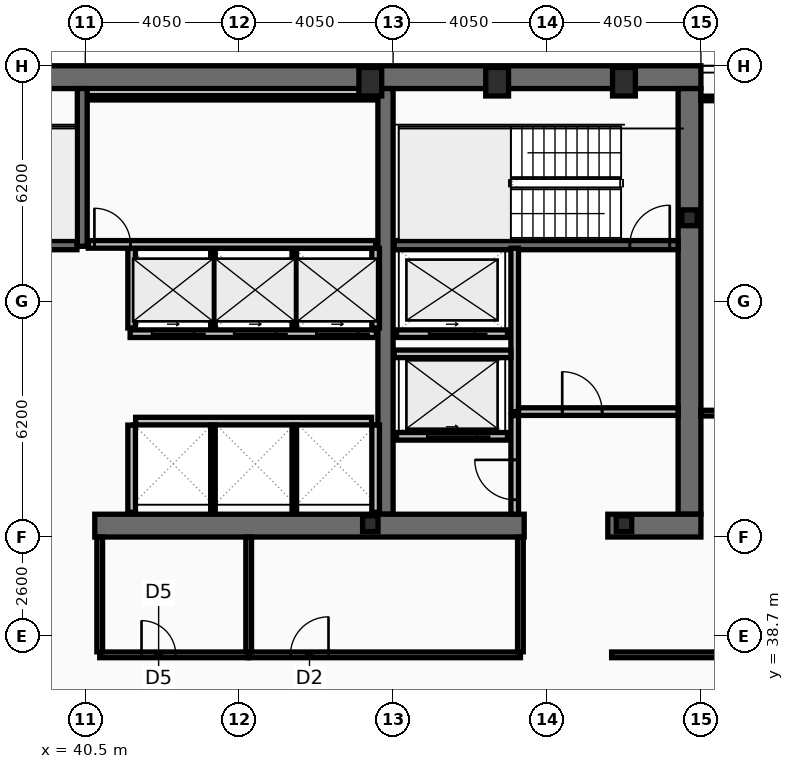
"""IFC4 building model, lengths in metres.
Left out: names, types, materials, properties, quantities, classifications, styles, units other than length and angle.
Written with IfcOpenShell. Run it as: python <this file> out.ifc"""

import sys

from ifc_helpers import new_model, si_unit, direction, frame, frame_2d, origin, origin_2d, place, context, subcontext, project, spatial, rectangle, hollow_rectangle, i_section, extrude, element, fill, save


model = new_model("IFC4")
c1 = context("Model", 3, precision=1e-05, world=origin(), true_north=direction((0.0, 1.0)))
c2 = subcontext(c1, "Body", "Model", "MODEL_VIEW")
j1 = project(units=[si_unit("LENGTHUNIT", "METRE"), si_unit("PLANEANGLEUNIT", "RADIAN")], contexts=[c1])
p1 = place(None, origin())
s1 = spatial("IfcSite", under=j1, at=p1, CompositionType="ELEMENT")
p2 = place(p1, origin())
s2 = spatial("IfcBuilding", under=s1, at=p2, CompositionType="ELEMENT")
p3 = place(p2, frame((0.0, 0.0, 228.2)))
s3 = spatial("IfcBuildingStorey", under=s2, at=p3, CompositionType="ELEMENT", Elevation=228.2)
p4 = place(p3, frame((16.2, 53.4, 0.0), z_axis=(0.0, 0.0, 1.0), x_axis=(1.0, 0.0, 0.0)))
e1 = element("IfcWall", 1, at=p4, inside=s3, PredefinedType="SHEAR", context=c2, shape_type="SweptSolid", body=[
    extrude(rectangle(XDim=40.5, YDim=0.6, at=frame_2d((20.25, 0.0))), origin(), (0.0, 0.0, 1.0), 3.44),
])
p5 = place(p3, frame((56.4, 53.1, 0.0), z_axis=(0.0, 0.0, 1.0), x_axis=(0.0, -1.0, 0.0)))
e2 = element("IfcWall", 2, at=p5, inside=s3, PredefinedType="SHEAR", context=c2, shape_type="SweptSolid", body=[
    extrude(rectangle(XDim=11.2, YDim=0.6, at=frame_2d((5.6, 0.0))), origin(), (0.0, 0.0, 1.0), 3.44),
])
p6 = place(p3, frame((48.4, 41.9, 0.0), z_axis=(0.0, 0.0, 1.0), x_axis=(0.0, 1.0, 0.0)))
e3 = element("IfcWall", 3, at=p6, inside=s3, PredefinedType="SHEAR", context=c2, shape_type="SweptSolid", body=[
    extrude(rectangle(XDim=11.2, YDim=0.4, at=frame_2d((5.6, 0.0))), origin(), (0.0, 0.0, 1.0), 3.44),
])
p7 = place(p3, frame((52.05, 41.6, 0.0), z_axis=(0.0, 0.0, 1.0), x_axis=(-1.0, 0.0, 0.0)))
e4 = element("IfcWall", 4, at=p7, inside=s3, PredefinedType="SHEAR", context=c2, shape_type="SweptSolid", body=[
    extrude(rectangle(XDim=11.3, YDim=0.6, at=frame_2d((5.65, 0.0))), origin(), (0.0, 0.0, 1.0), 3.44),
])
p8 = place(p3, frame((56.7, 41.6, 0.0), z_axis=(0.0, 0.0, 1.0), x_axis=(-1.0, 0.0, 0.0)))
e5 = element("IfcWall", 5, at=p8, inside=s3, PredefinedType="SHEAR", context=c2, shape_type="SweptSolid", body=[
    extrude(rectangle(XDim=2.45, YDim=0.6, at=frame_2d((1.225, 0.0))), origin(), (0.0, 0.0, 1.0), 3.44),
])
p9 = place(p3, frame((40.42, 48.95, 0.0), z_axis=(0.0, 0.0, 1.0), x_axis=(0.0, 1.0, 0.0)))
e6 = element("IfcWall", 6, at=p9, inside=s3, PredefinedType="SHEAR", context=c2, shape_type="SweptSolid", body=[
    extrude(rectangle(XDim=4.15, YDim=0.26, at=frame_2d((2.075, 0.0))), origin(), (0.0, 0.0, 1.0), 3.44),
])
p10 = place(p3, frame((48.63, 48.98, 0.0), z_axis=(0.0, 0.0, 1.0), x_axis=(1.0, 0.0, 0.0)))
e7 = element("IfcWall", 7, at=p10, inside=s3, PredefinedType="SHEAR", context=c2, shape_type="SweptSolid", body=[
    extrude(rectangle(XDim=7.47, YDim=0.24, at=frame_2d((3.735, 0.0))), origin(), (0.0, 0.0, 1.0), 3.44),
])
p11 = place(p10, frame((6.2, 0.0, 0.0)))
e8 = element("IfcOpeningElement", 8, at=p11, cuts=e7, PredefinedType="OPENING", context=c2, shape_type="SweptSolid", body=[
    extrude(rectangle(XDim=1.05, YDim=2.15, at=frame_2d((0.525, 1.075))), frame((0.0, 0.13, 0.0), z_axis=(0.0, -1.0, 0.0), x_axis=(1.0, 0.0, 0.0)), (0.0, 0.0, 1.0), 0.26),
])
p12 = place(p3, frame((32.72, 48.98, 0.0), z_axis=(0.0, 0.0, 1.0), x_axis=(1.0, 0.0, 0.0)))
e9 = element("IfcWall", 9, at=p12, inside=s3, PredefinedType="SHEAR", context=c2, shape_type="SweptSolid", body=[
    extrude(rectangle(XDim=7.56, YDim=0.24, at=frame_2d((3.78, 0.0))), origin(), (0.0, 0.0, 1.0), 3.44),
])
p13 = place(p12, frame((0.22, 0.0, 0.0)))
e10 = element("IfcOpeningElement", 10, at=p13, cuts=e9, PredefinedType="OPENING", context=c2, shape_type="SweptSolid", body=[
    extrude(rectangle(XDim=1.05, YDim=2.15, at=frame_2d((0.525, 1.075))), frame((0.0, 0.13, 0.0), z_axis=(0.0, -1.0, 0.0), x_axis=(1.0, 0.0, 0.0)), (0.0, 0.0, 1.0), 0.26),
])
for number, where, z_axis, x_axis in (
    (11, (48.0, 53.28, 0.0), (0.0, 0.0, 1.0), (1.0, 0.0, 0.0)),
    (12, (51.337, 53.28, 0.0), (0.0, 0.0, 1.0), (1.0, 0.0, 0.0)),
    (13, (54.675, 53.28, 0.0), (0.0, 0.0, 1.0), (1.0, 0.0, 0.0)),
):
    element("IfcColumn", number, at=place(p3, frame(where, z_axis=z_axis, x_axis=x_axis)), inside=s3, PredefinedType="COLUMN", context=c2, shape_type="SweptSolid", body=[
        extrude(hollow_rectangle(XDim=0.6, YDim=0.75, WallThickness=0.045, at=origin_2d()), origin(), (0.0, 0.0, 1.0), 3.6),
    ])
for number, where, z_axis, x_axis in (
    (14, (56.4, 49.7, 0.0), (0.0, 0.0, 1.0), (1.0, 0.0, 0.0)),
    (15, (48.0, 41.65, 0.0), (0.0, 0.0, 1.0), (1.0, 0.0, 0.0)),
    (16, (54.675, 41.65, 0.0), (0.0, 0.0, 1.0), (1.0, 0.0, 0.0)),
):
    element("IfcColumn", number, at=place(p3, frame(where, z_axis=z_axis, x_axis=x_axis)), inside=s3, PredefinedType="COLUMN", context=c2, shape_type="SweptSolid", body=[
        extrude(i_section(OverallWidth=0.406, OverallDepth=0.416, WebThickness=0.03, FlangeThickness=0.048, at=origin_2d()), origin(), (0.0, 0.0, 1.0), 3.6),
    ])
p14 = place(p3, frame((51.61, 43.95, 0.0), z_axis=(0.0, 0.0, 1.0), x_axis=(-1.0, 0.0, 0.0)))
e17 = element("IfcWall", 17, at=p14, inside=s3, PredefinedType="PARTITIONING", context=c2, shape_type="SweptSolid", body=[
    extrude(rectangle(XDim=2.92, YDim=0.2, at=frame_2d((1.46, 0.0))), origin(), (0.0, 0.0, 1.0), 3.44),
])
p15 = place(p14, frame((0.81, 0.0, 0.0)))
e18 = element("IfcOpeningElement", 18, at=p15, cuts=e17, PredefinedType="OPENING", context=c2, shape_type="SweptSolid", body=[
    extrude(rectangle(XDim=1.3, YDim=2.18, at=frame_2d((0.65, 1.09))), frame((0.0, 0.11, 0.0), z_axis=(0.0, -1.0, 0.0), x_axis=(1.0, 0.0, 0.0)), (0.0, 0.0, 1.0), 0.22),
])
p16 = place(p3, frame((51.61, 46.65, 0.0), z_axis=(0.0, 0.0, 1.0), x_axis=(-1.0, 0.0, 0.0)))
e19 = element("IfcWall", 19, at=p16, inside=s3, PredefinedType="PARTITIONING", context=c2, shape_type="SweptSolid", body=[
    extrude(rectangle(XDim=2.92, YDim=0.2, at=frame_2d((1.46, 0.0))), origin(), (0.0, 0.0, 1.0), 3.44),
])
p17 = place(p16, frame((0.86, 0.0, 0.0)))
e20 = element("IfcOpeningElement", 20, at=p17, cuts=e19, PredefinedType="OPENING", context=c2, shape_type="SweptSolid", body=[
    extrude(rectangle(XDim=1.2, YDim=2.18, at=frame_2d((0.6, 1.09))), frame((0.0, 0.11, 0.0), z_axis=(0.0, -1.0, 0.0), x_axis=(1.0, 0.0, 0.0)), (0.0, 0.0, 1.0), 0.22),
])
p18 = place(p3, frame((48.16, 46.65, 0.0), z_axis=(0.0, 0.0, 1.0), x_axis=(-1.0, 0.0, 0.0)))
e21 = element("IfcWall", 21, at=p18, inside=s3, PredefinedType="PARTITIONING", context=c2, shape_type="SweptSolid", body=[
    extrude(rectangle(XDim=6.48, YDim=0.2, at=frame_2d((3.24, 0.0))), origin(), (0.0, 0.0, 1.0), 3.44),
])
p19 = place(p18, frame((4.8, 0.0, 0.0)))
e22 = element("IfcOpeningElement", 22, at=p19, cuts=e21, PredefinedType="OPENING", context=c2, shape_type="SweptSolid", body=[
    extrude(rectangle(XDim=1.1, YDim=2.18, at=frame_2d((0.55, 1.09))), frame((0.0, 0.11, 0.0), z_axis=(0.0, -1.0, 0.0), x_axis=(1.0, 0.0, 0.0)), (0.0, 0.0, 1.0), 0.22),
])
p20 = place(p18, frame((2.64, 0.0, 0.0)))
e23 = element("IfcOpeningElement", 23, at=p20, cuts=e21, PredefinedType="OPENING", context=c2, shape_type="SweptSolid", body=[
    extrude(rectangle(XDim=1.1, YDim=2.18, at=frame_2d((0.55, 1.09))), frame((0.0, 0.11, 0.0), z_axis=(0.0, -1.0, 0.0), x_axis=(1.0, 0.0, 0.0)), (0.0, 0.0, 1.0), 0.22),
])
p21 = place(p18, frame((0.48, 0.0, 0.0)))
e24 = element("IfcOpeningElement", 24, at=p21, cuts=e21, PredefinedType="OPENING", context=c2, shape_type="SweptSolid", body=[
    extrude(rectangle(XDim=1.1, YDim=2.18, at=frame_2d((0.55, 1.09))), frame((0.0, 0.11, 0.0), z_axis=(0.0, -1.0, 0.0), x_axis=(1.0, 0.0, 0.0)), (0.0, 0.0, 1.0), 0.22),
])
p22 = place(p3, frame((51.8, 44.6, 0.0), z_axis=(0.0, 0.0, 1.0), x_axis=(0.0, 1.0, 0.0)))
e25 = element("IfcWall", 25, at=p22, inside=s3, PredefinedType="PARTITIONING", context=c2, shape_type="SweptSolid", body=[
    extrude(rectangle(XDim=4.3, YDim=0.2, at=frame_2d((2.15, 0.0))), origin(), (0.0, 0.0, 1.0), 3.44),
])
p23 = place(p3, frame((51.9, 44.6, 0.0), z_axis=(0.0, 0.0, 1.0), x_axis=(1.0, 0.0, 0.0)))
e26 = element("IfcWall", 26, at=p23, inside=s3, PredefinedType="PARTITIONING", context=c2, shape_type="SweptSolid", body=[
    extrude(rectangle(XDim=4.2, YDim=0.2, at=frame_2d((2.1, 0.0))), origin(), (0.0, 0.0, 1.0), 3.44),
])
p24 = place(p23, frame((1.15, 0.0, 0.0)))
e27 = element("IfcOpeningElement", 27, at=p24, cuts=e26, PredefinedType="OPENING", context=c2, shape_type="SweptSolid", body=[
    extrude(rectangle(XDim=1.05, YDim=2.15, at=frame_2d((0.525, 1.075))), frame((0.0, 0.11, 0.0), z_axis=(0.0, -1.0, 0.0), x_axis=(1.0, 0.0, 0.0)), (0.0, 0.0, 1.0), 0.22),
])
p25 = place(p3, frame((48.63, 46.12, 0.0), z_axis=(0.0, 0.0, 1.0), x_axis=(1.0, 0.0, 0.0)))
e28 = element("IfcWall", 28, at=p25, inside=s3, PredefinedType="PARTITIONING", context=c2, shape_type="SweptSolid", body=[
    extrude(rectangle(XDim=3.07, YDim=0.2, at=frame_2d((1.535, 0.0))), origin(), (0.0, 0.0, 1.0), 3.44),
])
p26 = place(p3, frame((51.8, 41.9, 0.0), z_axis=(0.0, 0.0, 1.0), x_axis=(0.0, 1.0, 0.0)))
e29 = element("IfcWall", 29, at=p26, inside=s3, PredefinedType="PARTITIONING", context=c2, shape_type="SweptSolid", body=[
    extrude(rectangle(XDim=2.595, YDim=0.2, at=frame_2d((1.298, 0.0))), origin(), (0.0, 0.0, 1.0), 3.44),
])
p27 = place(p26, frame((0.38, 0.0, 0.0)))
e30 = element("IfcOpeningElement", 30, at=p27, cuts=e29, PredefinedType="OPENING", context=c2, shape_type="SweptSolid", body=[
    extrude(rectangle(XDim=1.05, YDim=2.15, at=frame_2d((0.525, 1.075))), frame((0.0, 0.11, 0.0), z_axis=(0.0, -1.0, 0.0), x_axis=(1.0, 0.0, 0.0)), (0.0, 0.0, 1.0), 0.22),
])
for number, where, z_axis, x_axis in (
    (31, (41.72, 46.8, 0.0), (0.0, 0.0, 1.0), (0.0, 1.0, 0.0)),
    (32, (48.14, 46.8, 0.0), (0.0, 0.0, 1.0), (0.0, 1.0, 0.0)),
):
    element("IfcWall", number, at=place(p3, frame(where, z_axis=z_axis, x_axis=x_axis)), inside=s3, PredefinedType="PARTITIONING", context=c2, shape_type="SweptSolid", body=[
        extrude(rectangle(XDim=2.095, YDim=0.2, at=frame_2d((1.047, 0.0))), origin(), (0.0, 0.0, 1.0), 3.44),
    ])
for number, where, z_axis, x_axis in (
    (33, (43.86, 46.8, 0.0), (0.0, 0.0, 1.0), (0.0, 1.0, 0.0)),
    (34, (46.0, 46.8, 0.0), (0.0, 0.0, 1.0), (0.0, 1.0, 0.0)),
):
    element("IfcWall", number, at=place(p3, frame(where, z_axis=z_axis, x_axis=x_axis)), inside=s3, PredefinedType="PARTITIONING", context=c2, shape_type="SweptSolid", body=[
        extrude(rectangle(XDim=2.095, YDim=0.12, at=frame_2d((1.047, 0.0))), origin(), (0.0, 0.0, 1.0), 3.44),
    ])
p28 = place(p3, frame((41.825, 44.35, 0.0), z_axis=(0.0, 0.0, 1.0), x_axis=(1.0, 0.0, 0.0)))
e35 = element("IfcWall", 35, at=p28, inside=s3, PredefinedType="PARTITIONING", context=c2, shape_type="SweptSolid", body=[
    extrude(rectangle(XDim=6.21, YDim=0.2, at=frame_2d((3.105, 0.0))), origin(), (0.0, 0.0, 1.0), 3.44),
])
for number, where, z_axis, x_axis in (
    (36, (41.72, 41.95, 0.0), (0.0, 0.0, 1.0), (0.0, 1.0, 0.0)),
    (37, (48.14, 41.95, 0.0), (0.0, 0.0, 1.0), (0.0, 1.0, 0.0)),
):
    element("IfcWall", number, at=place(p3, frame(where, z_axis=z_axis, x_axis=x_axis)), inside=s3, PredefinedType="PARTITIONING", context=c2, shape_type="SweptSolid", body=[
        extrude(rectangle(XDim=2.295, YDim=0.2, at=frame_2d((1.147, 0.0))), origin(), (0.0, 0.0, 1.0), 3.44),
    ])
for number, where, z_axis, x_axis in (
    (38, (43.86, 41.95, 0.0), (0.0, 0.0, 1.0), (0.0, 1.0, 0.0)),
    (39, (46.0, 41.95, 0.0), (0.0, 0.0, 1.0), (0.0, 1.0, 0.0)),
):
    element("IfcWall", number, at=place(p3, frame(where, z_axis=z_axis, x_axis=x_axis)), inside=s3, PredefinedType="PARTITIONING", context=c2, shape_type="SweptSolid", body=[
        extrude(rectangle(XDim=2.295, YDim=0.12, at=frame_2d((1.147, 0.0))), origin(), (0.0, 0.0, 1.0), 3.44),
    ])
p29 = place(p3, frame((40.58, 52.86, 0.0), z_axis=(0.0, 0.0, 1.0), x_axis=(1.0, 0.0, 0.0)))
e40 = element("IfcWall", 40, at=p29, inside=s3, PredefinedType="PARTITIONING", context=c2, shape_type="SweptSolid", body=[
    extrude(rectangle(XDim=7.56, YDim=0.12, at=frame_2d((3.78, 0.0))), origin(), (0.0, 0.0, 1.0), 3.44),
])
p30 = place(p3, frame((40.58, 49.0, 0.0), z_axis=(0.0, 0.0, 1.0), x_axis=(1.0, 0.0, 0.0)))
e41 = element("IfcWall", 41, at=p30, inside=s3, PredefinedType="PARTITIONING", context=c2, shape_type="SweptSolid", body=[
    extrude(rectangle(XDim=7.56, YDim=0.2, at=frame_2d((3.78, 0.0))), origin(), (0.0, 0.0, 1.0), 3.44),
])
p31 = place(p30, frame((0.16, 0.0, 0.0)))
e42 = element("IfcOpeningElement", 42, at=p31, cuts=e41, PredefinedType="OPENING", context=c2, shape_type="SweptSolid", body=[
    extrude(rectangle(XDim=0.95, YDim=2.1, at=frame_2d((0.475, 1.05))), frame((0.0, 0.11, 0.0), z_axis=(0.0, -1.0, 0.0), x_axis=(1.0, 0.0, 0.0)), (0.0, 0.0, 1.0), 0.22),
])
p32 = place(p3, frame((40.88, 38.2, 0.0), z_axis=(0.0, 0.0, 1.0), x_axis=(1.0, 0.0, 0.0)))
e43 = element("IfcWall", 43, at=p32, inside=s3, PredefinedType="PARTITIONING", context=c2, shape_type="SweptSolid", body=[
    extrude(rectangle(XDim=3.92, YDim=0.15, at=frame_2d((1.96, 0.0))), origin(), (0.0, 0.0, 1.0), 2.78),
])
p33 = place(p32, frame((1.1, 0.0, 0.0)))
e44 = element("IfcOpeningElement", 44, at=p33, cuts=e43, PredefinedType="OPENING", context=c2, shape_type="SweptSolid", body=[
    extrude(rectangle(XDim=0.9, YDim=2.05, at=frame_2d((0.45, 1.025))), frame((0.0, 0.085, 0.0), z_axis=(0.0, -1.0, 0.0), x_axis=(1.0, 0.0, 0.0)), (0.0, 0.0, 1.0), 0.17),
])
p34 = place(p3, frame((44.8, 38.2, 0.0), z_axis=(0.0, 0.0, 1.0), x_axis=(1.0, 0.0, 0.0)))
e45 = element("IfcWall", 45, at=p34, inside=s3, PredefinedType="PARTITIONING", context=c2, shape_type="SweptSolid", body=[
    extrude(rectangle(XDim=7.15, YDim=0.15, at=frame_2d((3.575, 0.0))), origin(), (0.0, 0.0, 1.0), 2.78),
])
p35 = place(p34, frame((1.1, 0.0, 0.0)))
e46 = element("IfcOpeningElement", 46, at=p35, cuts=e45, PredefinedType="OPENING", context=c2, shape_type="SweptSolid", body=[
    extrude(rectangle(XDim=1.0, YDim=2.05, at=frame_2d((0.5, 1.025))), frame((0.0, 0.085, 0.0), z_axis=(0.0, -1.0, 0.0), x_axis=(1.0, 0.0, 0.0)), (0.0, 0.0, 1.0), 0.17),
])
for number, where, z_axis, x_axis in (
    (47, (40.88, 38.28, 0.0), (0.0, 0.0, 1.0), (0.0, 1.0, 0.0)),
    (48, (44.8, 38.28, 0.0), (0.0, 0.0, 1.0), (0.0, 1.0, 0.0)),
    (49, (51.95, 38.28, 0.0), (0.0, 0.0, 1.0), (0.0, 1.0, 0.0)),
):
    element("IfcWall", number, at=place(p3, frame(where, z_axis=z_axis, x_axis=x_axis)), inside=s3, PredefinedType="PARTITIONING", context=c2, shape_type="SweptSolid", body=[
        extrude(rectangle(XDim=3.02, YDim=0.15, at=frame_2d((1.51, 0.0))), origin(), (0.0, 0.0, 1.0), 3.44),
    ])
p36 = place(p3, frame((54.35, 38.2, 0.0), z_axis=(0.0, 0.0, 1.0), x_axis=(1.0, 0.0, 0.0)))
e50 = element("IfcWall", 50, at=p36, inside=s3, PredefinedType="PARTITIONING", context=c2, shape_type="SweptSolid", body=[
    extrude(rectangle(XDim=10.52, YDim=0.15, at=frame_2d((5.26, 0.0))), origin(), (0.0, 0.0, 1.0), 2.78),
])
p37 = place(p36, frame((3.25, 0.0, 0.0)))
e51 = element("IfcOpeningElement", 51, at=p37, cuts=e50, PredefinedType="OPENING", context=c2, shape_type="SweptSolid", body=[
    extrude(rectangle(XDim=0.95, YDim=2.05, at=frame_2d((0.475, 1.025))), frame((0.0, 0.085, 0.0), z_axis=(0.0, -1.0, 0.0), x_axis=(1.0, 0.0, 0.0)), (0.0, 0.0, 1.0), 0.17),
])
p38 = place(p3, frame((56.7, 44.56, 0.0), z_axis=(0.0, 0.0, 1.0), x_axis=(1.0, 0.0, 0.0)))
e52 = element("IfcWall", 52, at=p38, inside=s3, PredefinedType="PARTITIONING", context=c2, shape_type="SweptSolid", body=[
    extrude(rectangle(XDim=8.105, YDim=0.15, at=frame_2d((4.052, 0.0))), origin(), (0.0, 0.0, 1.0), 2.83),
])
p39 = place(p38, frame((0.9, 0.0, 0.0)))
e53 = element("IfcOpeningElement", 53, at=p39, cuts=e52, PredefinedType="OPENING", context=c2, shape_type="SweptSolid", body=[
    extrude(rectangle(XDim=0.9, YDim=2.05, at=frame_2d((0.45, 1.025))), frame((0.0, 0.085, 0.0), z_axis=(0.0, -1.0, 0.0), x_axis=(1.0, 0.0, 0.0)), (0.0, 0.0, 1.0), 0.17),
])
p40 = place(p3, frame((56.7, 52.84, 0.0), z_axis=(0.0, 0.0, 1.0), x_axis=(1.0, 0.0, 0.0)))
e54 = element("IfcWall", 54, at=p40, inside=s3, PredefinedType="PARTITIONING", context=c2, shape_type="SweptSolid", body=[
    extrude(rectangle(XDim=8.105, YDim=0.12, at=frame_2d((4.052, 0.0))), origin(), (0.0, 0.0, 1.0), 3.44),
])
p41 = place(p11, origin())
e55 = element("IfcDoor", 55, at=p41, inside=s3, OperationType="SINGLE_SWING_RIGHT", PredefinedType="DOOR", context=c2, shape_type="SweptSolid", body=[
    extrude(rectangle(XDim=1.05, YDim=2.15, at=frame_2d((0.525, 1.075))), frame((0.0, 0.025, 0.0), z_axis=(0.0, -1.0, 0.0), x_axis=(1.0, 0.0, 0.0)), (0.0, 0.0, 1.0), 0.05),
])
fill(e8, e55)
p42 = place(p15, origin())
e56 = element("IfcDoor", 56, at=p42, inside=s3, OperationType="SLIDING_TO_LEFT", PredefinedType="DOOR", context=c2, shape_type="SweptSolid", body=[
    extrude(rectangle(XDim=1.3, YDim=2.18, at=frame_2d((0.65, 1.09))), frame((0.0, 0.025, 0.0), z_axis=(0.0, -1.0, 0.0), x_axis=(1.0, 0.0, 0.0)), (0.0, 0.0, 1.0), 0.05),
])
fill(e18, e56)
p43 = place(p17, origin())
e57 = element("IfcDoor", 57, at=p43, inside=s3, OperationType="SLIDING_TO_LEFT", PredefinedType="DOOR", context=c2, shape_type="SweptSolid", body=[
    extrude(rectangle(XDim=1.2, YDim=2.18, at=frame_2d((0.6, 1.09))), frame((0.0, 0.025, 0.0), z_axis=(0.0, -1.0, 0.0), x_axis=(1.0, 0.0, 0.0)), (0.0, 0.0, 1.0), 0.05),
])
fill(e20, e57)
p44 = place(p19, origin())
e58 = element("IfcDoor", 58, at=p44, inside=s3, OperationType="SLIDING_TO_LEFT", PredefinedType="DOOR", context=c2, shape_type="SweptSolid", body=[
    extrude(rectangle(XDim=1.1, YDim=2.18, at=frame_2d((0.55, 1.09))), frame((0.0, 0.025, 0.0), z_axis=(0.0, -1.0, 0.0), x_axis=(1.0, 0.0, 0.0)), (0.0, 0.0, 1.0), 0.05),
])
fill(e22, e58)
p45 = place(p20, origin())
e59 = element("IfcDoor", 59, at=p45, inside=s3, OperationType="SLIDING_TO_LEFT", PredefinedType="DOOR", context=c2, shape_type="SweptSolid", body=[
    extrude(rectangle(XDim=1.1, YDim=2.18, at=frame_2d((0.55, 1.09))), frame((0.0, 0.025, 0.0), z_axis=(0.0, -1.0, 0.0), x_axis=(1.0, 0.0, 0.0)), (0.0, 0.0, 1.0), 0.05),
])
fill(e23, e59)
p46 = place(p21, origin())
e60 = element("IfcDoor", 60, at=p46, inside=s3, OperationType="SLIDING_TO_LEFT", PredefinedType="DOOR", context=c2, shape_type="SweptSolid", body=[
    extrude(rectangle(XDim=1.1, YDim=2.18, at=frame_2d((0.55, 1.09))), frame((0.0, 0.025, 0.0), z_axis=(0.0, -1.0, 0.0), x_axis=(1.0, 0.0, 0.0)), (0.0, 0.0, 1.0), 0.05),
])
fill(e24, e60)
p47 = place(p24, origin())
e61 = element("IfcDoor", 61, at=p47, inside=s3, OperationType="SINGLE_SWING_LEFT", PredefinedType="DOOR", context=c2, shape_type="SweptSolid", body=[
    extrude(rectangle(XDim=1.05, YDim=2.15, at=frame_2d((0.525, 1.075))), frame((0.0, 0.025, 0.0), z_axis=(0.0, -1.0, 0.0), x_axis=(1.0, 0.0, 0.0)), (0.0, 0.0, 1.0), 0.05),
])
fill(e27, e61)
p48 = place(p27, origin())
e62 = element("IfcDoor", 62, at=p48, inside=s3, OperationType="SINGLE_SWING_RIGHT", PredefinedType="DOOR", context=c2, shape_type="SweptSolid", body=[
    extrude(rectangle(XDim=1.05, YDim=2.15, at=frame_2d((0.525, 1.075))), frame((0.0, 0.025, 0.0), z_axis=(0.0, -1.0, 0.0), x_axis=(1.0, 0.0, 0.0)), (0.0, 0.0, 1.0), 0.05),
])
fill(e30, e62)
p49 = place(p31, origin())
e63 = element("IfcDoor", 63, at=p49, inside=s3, OperationType="SINGLE_SWING_LEFT", PredefinedType="DOOR", context=c2, shape_type="SweptSolid", body=[
    extrude(rectangle(XDim=0.95, YDim=2.1, at=frame_2d((0.475, 1.05))), frame((0.0, 0.025, 0.0), z_axis=(0.0, -1.0, 0.0), x_axis=(1.0, 0.0, 0.0)), (0.0, 0.0, 1.0), 0.05),
])
fill(e42, e63)
p50 = place(p33, origin())
e64 = element("IfcDoor", 64, at=p50, inside=s3, OperationType="SINGLE_SWING_LEFT", PredefinedType="DOOR", context=c2, shape_type="SweptSolid", body=[
    extrude(rectangle(XDim=0.9, YDim=2.05, at=frame_2d((0.45, 1.025))), frame((0.0, 0.025, 0.0), z_axis=(0.0, -1.0, 0.0), x_axis=(1.0, 0.0, 0.0)), (0.0, 0.0, 1.0), 0.05),
])
fill(e44, e64)
p51 = place(p35, origin())
e65 = element("IfcDoor", 65, at=p51, inside=s3, OperationType="SINGLE_SWING_RIGHT", PredefinedType="DOOR", context=c2, shape_type="SweptSolid", body=[
    extrude(rectangle(XDim=1.0, YDim=2.05, at=frame_2d((0.5, 1.025))), frame((0.0, 0.025, 0.0), z_axis=(0.0, -1.0, 0.0), x_axis=(1.0, 0.0, 0.0)), (0.0, 0.0, 1.0), 0.05),
])
fill(e46, e65)
save(model, sys.argv[1])
